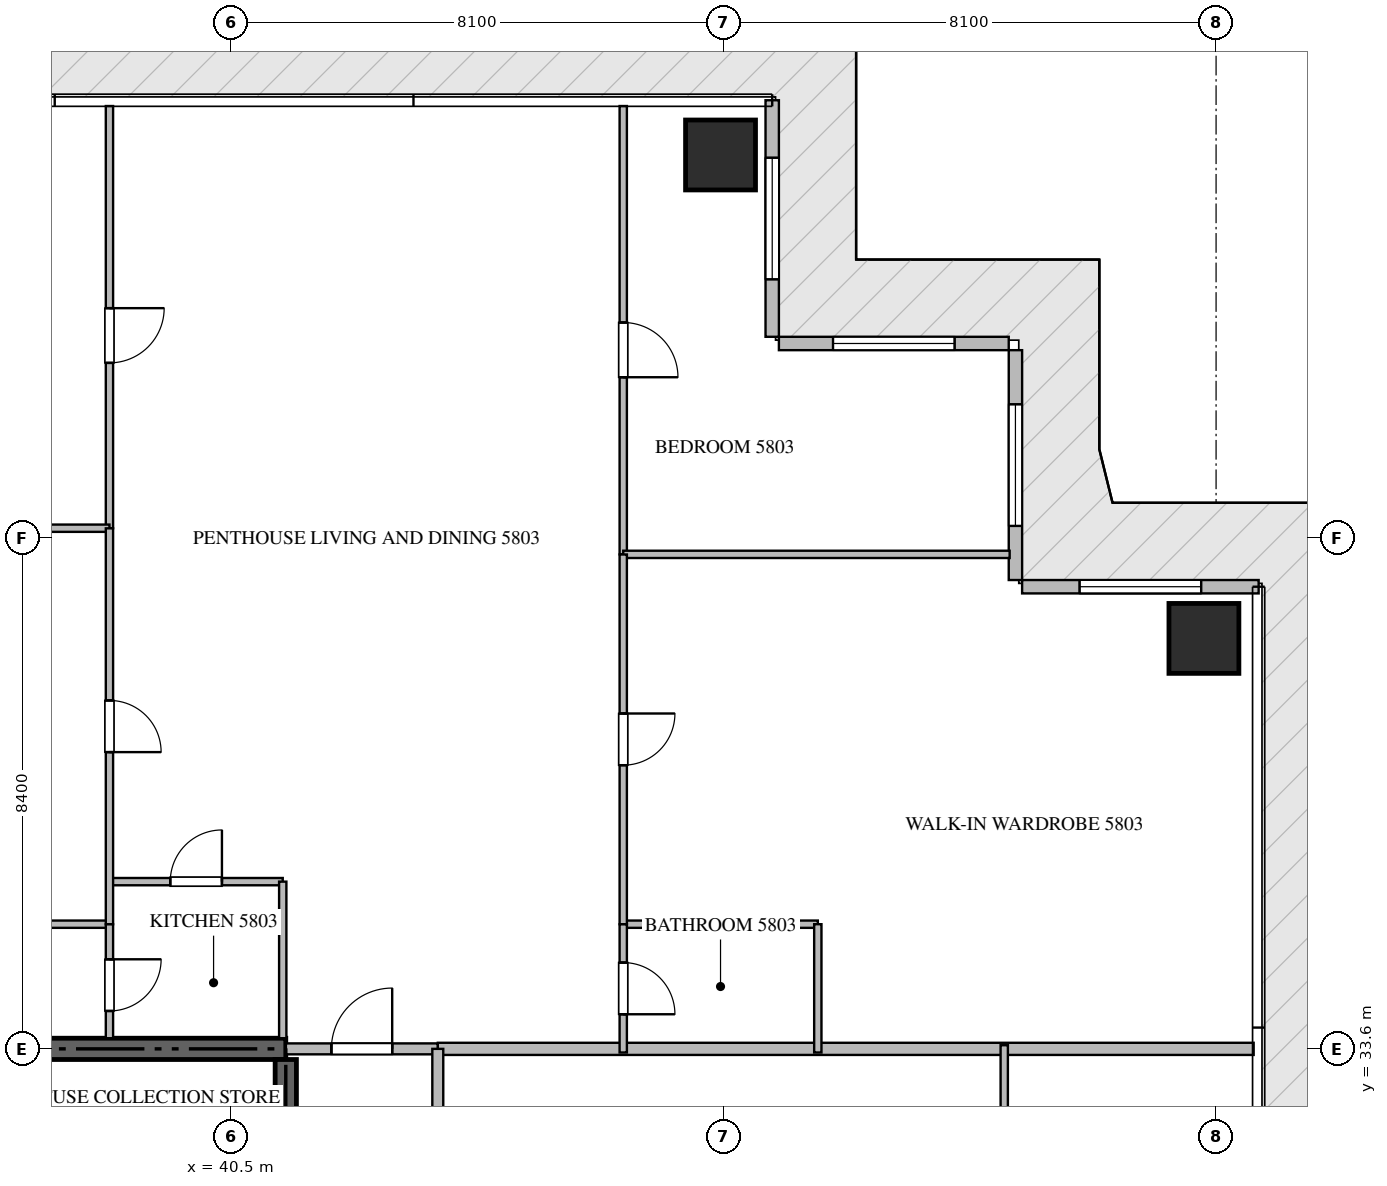
"""IFC4 building model, lengths in metres.
Left out: names, types, materials, properties, quantities, classifications, styles, units other than length and angle.
Written with IfcOpenShell. Run it as: python <this file> out.ifc"""

import sys

from ifc_helpers import new_model, si_unit, direction, frame, frame_2d, origin, origin_2d, place, context, subcontext, project, spatial, rectangle, extrude, source, transform, mapped, element, fill, save


model = new_model("IFC4")
c1 = context("Model", 3, precision=1e-05, world=origin(), true_north=direction((0.0, 1.0)))
c2 = subcontext(c1, "Body", "Model", "MODEL_VIEW")
j1 = project(units=[si_unit("LENGTHUNIT", "METRE"), si_unit("PLANEANGLEUNIT", "RADIAN")], contexts=[c1])
p1 = place(None, origin())
s1 = spatial("IfcSite", under=j1, at=p1, CompositionType="ELEMENT")
p2 = place(p1, origin())
s2 = spatial("IfcBuilding", under=s1, at=p2, CompositionType="ELEMENT")
p3 = place(p2, frame((0.0, 0.0, 233.55)))
s3 = spatial("IfcBuildingStorey", under=s2, at=p3, CompositionType="ELEMENT", Elevation=233.55)
p4 = place(p3, frame((41.4, 33.6, -0.26), z_axis=(0.0, 0.0, 1.0), x_axis=(-1.0, 0.0, 0.0)))
e1 = element("IfcWall", 1, at=p4, inside=s3, PredefinedType="SHEAR", context=c2, shape_type="SweptSolid", body=[
    extrude(rectangle(XDim=18.0, YDim=0.35, at=frame_2d((9.0, 0.0))), origin(), (0.0, 0.0, 1.0), 3.848),
])
p5 = place(p3, frame((41.4, 27.75, -0.26), z_axis=(0.0, 0.0, 1.0), x_axis=(0.0, 1.0, 0.0)))
e2 = element("IfcWall", 2, at=p5, inside=s3, PredefinedType="SHEAR", context=c2, shape_type="SweptSolid", body=[
    extrude(rectangle(XDim=5.675, YDim=0.35, at=frame_2d((2.837, 0.0))), origin(), (0.0, 0.0, 1.0), 3.848),
])
m1 = source(origin(), c2, "Body", "SweptSolid", [
    extrude(rectangle(XDim=1.15, YDim=1.15, at=origin_2d()), origin(), (0.0, 0.0, 1.0), 3.85),
])
for number, where, z_axis, x_axis in (
    (3, (48.55, 48.3, -0.26), (0.0, 0.0, 1.0), (1.0, 0.0, 0.0)),
    (4, (56.5, 40.35, -0.26), (0.0, 0.0, 1.0), (1.0, 0.0, 0.0)),
):
    element("IfcColumn", number, at=place(p3, frame(where, z_axis=z_axis, x_axis=x_axis)), inside=s3, PredefinedType="COLUMN", context=c2, shape_type="MappedRepresentation", body=[
        mapped(m1, transform((0.0, 0.0, 0.0), scale=1.0)),
    ])
p6 = place(p3, frame((57.4, 41.2, 0.0), z_axis=(0.0, 0.0, 1.0), x_axis=(-1.0, 0.0, 0.0)))
e5 = element("IfcWall", 5, at=p6, inside=s3, PredefinedType="ELEMENTEDWALL", context=c2, shape_type="SweptSolid", body=[
    extrude(rectangle(XDim=3.89, YDim=0.22, at=frame_2d((1.945, 0.0))), origin(), (0.0, 0.0, 1.0), 3.575),
])
p7 = place(p6, frame((0.945, 0.0, 0.65)))
e6 = element("IfcOpeningElement", 6, at=p7, cuts=e5, PredefinedType="OPENING", context=c2, shape_type="SweptSolid", body=[
    extrude(rectangle(XDim=2.0, YDim=2.2, at=frame_2d((1.0, 1.1))), frame((0.0, 0.12, 0.0), z_axis=(0.0, -1.0, 0.0), x_axis=(1.0, 0.0, 0.0)), (0.0, 0.0, 1.0), 0.24),
])
p8 = place(p3, frame((53.4, 41.31, 0.0), z_axis=(0.0, 0.0, 1.0), x_axis=(0.0, 1.0, 0.0)))
e7 = element("IfcWall", 7, at=p8, inside=s3, PredefinedType="ELEMENTEDWALL", context=c2, shape_type="SweptSolid", body=[
    extrude(rectangle(XDim=3.78, YDim=0.22, at=frame_2d((1.89, 0.0))), origin(), (0.0, 0.0, 1.0), 3.575),
])
p9 = place(p8, frame((0.89, 0.0, 0.65)))
e8 = element("IfcOpeningElement", 8, at=p9, cuts=e7, PredefinedType="OPENING", context=c2, shape_type="SweptSolid", body=[
    extrude(rectangle(XDim=2.0, YDim=2.2, at=frame_2d((1.0, 1.1))), frame((0.0, 0.12, 0.0), z_axis=(0.0, -1.0, 0.0), x_axis=(1.0, 0.0, 0.0)), (0.0, 0.0, 1.0), 0.24),
])
p10 = place(p3, frame((53.29, 45.2, 0.0), z_axis=(0.0, 0.0, 1.0), x_axis=(-1.0, 0.0, 0.0)))
e9 = element("IfcWall", 9, at=p10, inside=s3, PredefinedType="ELEMENTEDWALL", context=c2, shape_type="SweptSolid", body=[
    extrude(rectangle(XDim=3.78, YDim=0.22, at=frame_2d((1.89, 0.0))), origin(), (0.0, 0.0, 1.0), 3.575),
])
p11 = place(p10, frame((0.89, 0.0, 0.65)))
e10 = element("IfcOpeningElement", 10, at=p11, cuts=e9, PredefinedType="OPENING", context=c2, shape_type="SweptSolid", body=[
    extrude(rectangle(XDim=2.0, YDim=2.2, at=frame_2d((1.0, 1.1))), frame((0.0, 0.12, 0.0), z_axis=(0.0, -1.0, 0.0), x_axis=(1.0, 0.0, 0.0)), (0.0, 0.0, 1.0), 0.24),
])
p12 = place(p3, frame((49.4, 45.31, 0.0), z_axis=(0.0, 0.0, 1.0), x_axis=(0.0, 1.0, 0.0)))
e11 = element("IfcWall", 11, at=p12, inside=s3, PredefinedType="ELEMENTEDWALL", context=c2, shape_type="SweptSolid", body=[
    extrude(rectangle(XDim=3.89, YDim=0.22, at=frame_2d((1.945, 0.0))), origin(), (0.0, 0.0, 1.0), 3.575),
])
p13 = place(p12, frame((0.945, 0.0, 0.65)))
e12 = element("IfcOpeningElement", 12, at=p13, cuts=e11, PredefinedType="OPENING", context=c2, shape_type="SweptSolid", body=[
    extrude(rectangle(XDim=2.0, YDim=2.2, at=frame_2d((1.0, 1.1))), frame((0.0, 0.12, 0.0), z_axis=(0.0, -1.0, 0.0), x_axis=(1.0, 0.0, 0.0)), (0.0, 0.0, 1.0), 0.24),
])
p14 = place(p3, frame((43.9, 33.6, 0.0), z_axis=(0.0, 0.0, 1.0), x_axis=(1.0, 0.0, 0.0)))
e13 = element("IfcWall", 13, at=p14, inside=s3, PredefinedType="PARTITIONING", context=c2, shape_type="SweptSolid", body=[
    extrude(rectangle(XDim=13.418, YDim=0.2, at=frame_2d((6.709, 0.0))), origin(), (0.0, 0.0, 1.0), 3.59),
])
p15 = place(p3, frame((41.402, 33.6, 0.0), z_axis=(0.0, 0.0, 1.0), x_axis=(1.0, 0.0, 0.0)))
e14 = element("IfcWall", 14, at=p15, inside=s3, PredefinedType="PARTITIONING", context=c2, shape_type="SweptSolid", body=[
    extrude(rectangle(XDim=2.496, YDim=0.18, at=frame_2d((1.248, 0.0))), origin(), (0.0, 0.0, 1.0), 3.59),
])
p16 = place(p15, frame((0.748, 0.0, 0.0)))
e15 = element("IfcOpeningElement", 15, at=p16, cuts=e14, PredefinedType="OPENING", context=c2, shape_type="SweptSolid", body=[
    extrude(rectangle(XDim=1.0, YDim=2.15, at=frame_2d((0.5, 1.075))), frame((0.0, 0.1, 0.0), z_axis=(0.0, -1.0, 0.0), x_axis=(1.0, 0.0, 0.0)), (0.0, 0.0, 1.0), 0.2),
])
p17 = place(p3, frame((43.9, 16.8, 0.0), z_axis=(0.0, 0.0, 1.0), x_axis=(0.0, 1.0, 0.0)))
e16 = element("IfcWall", 16, at=p17, inside=s3, PredefinedType="PARTITIONING", context=c2, shape_type="SweptSolid", body=[
    extrude(rectangle(XDim=16.8, YDim=0.18, at=frame_2d((8.4, 0.0))), origin(), (0.0, 0.0, 1.0), 3.59),
])
p18 = place(p17, frame((1.3, 0.0, 0.0)))
e17 = element("IfcOpeningElement", 17, at=p18, cuts=e16, PredefinedType="OPENING", context=c2, shape_type="SweptSolid", body=[
    extrude(rectangle(XDim=1.0, YDim=2.15, at=frame_2d((0.5, 1.075))), frame((0.0, 0.1, 0.0), z_axis=(0.0, -1.0, 0.0), x_axis=(1.0, 0.0, 0.0)), (0.0, 0.0, 1.0), 0.2),
])
p19 = place(p3, frame((38.5, 36.35, 0.0), z_axis=(0.0, 0.0, 1.0), x_axis=(1.0, 0.0, 0.0)))
e18 = element("IfcWall", 18, at=p19, inside=s3, PredefinedType="PARTITIONING", context=c2, shape_type="SweptSolid", body=[
    extrude(rectangle(XDim=2.85, YDim=0.12, at=frame_2d((1.425, 0.0))), origin(), (0.0, 0.0, 1.0), 3.59),
])
p20 = place(p19, frame((1.0, 0.0, 0.0)))
e19 = element("IfcOpeningElement", 19, at=p20, cuts=e18, PredefinedType="OPENING", context=c2, shape_type="SweptSolid", body=[
    extrude(rectangle(XDim=0.85, YDim=2.1, at=frame_2d((0.425, 1.05))), frame((0.0, 0.07, 0.0), z_axis=(0.0, -1.0, 0.0), x_axis=(1.0, 0.0, 0.0)), (0.0, 0.0, 1.0), 0.14),
])
p21 = place(p3, frame((41.35, 36.35, 0.0), z_axis=(0.0, 0.0, 1.0), x_axis=(0.0, -1.0, 0.0)))
e20 = element("IfcWall", 20, at=p21, inside=s3, PredefinedType="PARTITIONING", context=c2, shape_type="SweptSolid", body=[
    extrude(rectangle(XDim=2.575, YDim=0.12, at=frame_2d((1.288, 0.0))), origin(), (0.0, 0.0, 1.0), 3.59),
])
p22 = place(p3, frame((38.5, 49.105, 0.0), z_axis=(0.0, 0.0, 1.0), x_axis=(0.0, -1.0, 0.0)))
e21 = element("IfcWall", 21, at=p22, inside=s3, PredefinedType="PARTITIONING", context=c2, shape_type="SweptSolid", body=[
    extrude(rectangle(XDim=6.943, YDim=0.12, at=frame_2d((3.471, 0.0))), origin(), (0.0, 0.0, 1.0), 3.59),
])
p23 = place(p22, frame((3.324, 0.0, 0.0)))
e22 = element("IfcOpeningElement", 22, at=p23, cuts=e21, PredefinedType="OPENING", context=c2, shape_type="SweptSolid", body=[
    extrude(rectangle(XDim=0.9, YDim=2.1, at=frame_2d((0.45, 1.05))), frame((0.0, 0.07, 0.0), z_axis=(0.0, -1.0, 0.0), x_axis=(1.0, 0.0, 0.0)), (0.0, 0.0, 1.0), 0.14),
])
p24 = place(p3, frame((32.34, 42.162, 0.0), z_axis=(0.0, 0.0, 1.0), x_axis=(1.0, 0.0, 0.0)))
e23 = element("IfcWall", 23, at=p24, inside=s3, PredefinedType="PARTITIONING", context=c2, shape_type="SweptSolid", body=[
    extrude(rectangle(XDim=6.16, YDim=0.12, at=frame_2d((3.08, 0.0))), origin(), (0.0, 0.0, 1.0), 3.59),
])
p25 = place(p3, frame((32.462, 35.65, 0.0), z_axis=(0.0, 0.0, 1.0), x_axis=(1.0, 0.0, 0.0)))
e24 = element("IfcWall", 24, at=p25, inside=s3, PredefinedType="PARTITIONING", context=c2, shape_type="SweptSolid", body=[
    extrude(rectangle(XDim=6.038, YDim=0.12, at=frame_2d((3.019, 0.0))), origin(), (0.0, 0.0, 1.0), 3.59),
])
p26 = place(p3, frame((38.5, 42.16, 0.0), z_axis=(0.0, 0.0, 1.0), x_axis=(0.0, -1.0, 0.0)))
e25 = element("IfcWall", 25, at=p26, inside=s3, PredefinedType="PARTITIONING", context=c2, shape_type="SweptSolid", body=[
    extrude(rectangle(XDim=6.51, YDim=0.12, at=frame_2d((3.255, 0.0))), origin(), (0.0, 0.0, 1.0), 3.59),
])
p27 = place(p26, frame((2.83, 0.0, 0.0)))
e26 = element("IfcOpeningElement", 26, at=p27, cuts=e25, PredefinedType="OPENING", context=c2, shape_type="SweptSolid", body=[
    extrude(rectangle(XDim=0.85, YDim=2.1, at=frame_2d((0.425, 1.05))), frame((0.0, 0.07, 0.0), z_axis=(0.0, -1.0, 0.0), x_axis=(1.0, 0.0, 0.0)), (0.0, 0.0, 1.0), 0.14),
])
p28 = place(p3, frame((38.5, 35.648, 0.0), z_axis=(0.0, 0.0, 1.0), x_axis=(0.0, -1.0, 0.0)))
e27 = element("IfcWall", 27, at=p28, inside=s3, PredefinedType="PARTITIONING", context=c2, shape_type="SweptSolid", body=[
    extrude(rectangle(XDim=1.873, YDim=0.12, at=frame_2d((0.937, 0.0))), origin(), (0.0, 0.0, 1.0), 3.59),
])
p29 = place(p28, frame((0.575, 0.0, 0.0)))
e28 = element("IfcOpeningElement", 28, at=p29, cuts=e27, PredefinedType="OPENING", context=c2, shape_type="SweptSolid", body=[
    extrude(rectangle(XDim=0.85, YDim=2.1, at=frame_2d((0.425, 1.05))), frame((0.0, 0.07, 0.0), z_axis=(0.0, -1.0, 0.0), x_axis=(1.0, 0.0, 0.0)), (0.0, 0.0, 1.0), 0.14),
])
p30 = place(p3, frame((46.95, 49.105, 0.0), z_axis=(0.0, 0.0, 1.0), x_axis=(0.0, -1.0, 0.0)))
e29 = element("IfcWall", 29, at=p30, inside=s3, PredefinedType="PARTITIONING", context=c2, shape_type="SweptSolid", body=[
    extrude(rectangle(XDim=7.373, YDim=0.12, at=frame_2d((3.687, 0.0))), origin(), (0.0, 0.0, 1.0), 3.59),
])
p31 = place(p30, frame((3.56, 0.0, 0.0)))
e30 = element("IfcOpeningElement", 30, at=p31, cuts=e29, PredefinedType="OPENING", context=c2, shape_type="SweptSolid", body=[
    extrude(rectangle(XDim=0.9, YDim=2.1, at=frame_2d((0.45, 1.05))), frame((0.0, 0.07, 0.0), z_axis=(0.0, -1.0, 0.0), x_axis=(1.0, 0.0, 0.0)), (0.0, 0.0, 1.0), 0.14),
])
p32 = place(p3, frame((46.95, 41.732, 0.0), z_axis=(0.0, 0.0, 1.0), x_axis=(1.0, 0.0, 0.0)))
e31 = element("IfcWall", 31, at=p32, inside=s3, PredefinedType="PARTITIONING", context=c2, shape_type="SweptSolid", body=[
    extrude(rectangle(XDim=6.355, YDim=0.12, at=frame_2d((3.177, 0.0))), origin(), (0.0, 0.0, 1.0), 3.59),
])
p33 = place(p3, frame((46.95, 35.65, 0.0), z_axis=(0.0, 0.0, 1.0), x_axis=(1.0, 0.0, 0.0)))
e32 = element("IfcWall", 32, at=p33, inside=s3, PredefinedType="PARTITIONING", context=c2, shape_type="SweptSolid", body=[
    extrude(rectangle(XDim=3.2, YDim=0.12, at=frame_2d((1.6, 0.0))), origin(), (0.0, 0.0, 1.0), 3.59),
])
p34 = place(p3, frame((50.15, 35.65, 0.0), z_axis=(0.0, 0.0, 1.0), x_axis=(0.0, -1.0, 0.0)))
e33 = element("IfcWall", 33, at=p34, inside=s3, PredefinedType="PARTITIONING", context=c2, shape_type="SweptSolid", body=[
    extrude(rectangle(XDim=2.11, YDim=0.12, at=frame_2d((1.055, 0.0))), origin(), (0.0, 0.0, 1.0), 3.59),
])
p35 = place(p3, frame((46.95, 41.73, 0.0), z_axis=(0.0, 0.0, 1.0), x_axis=(0.0, -1.0, 0.0)))
e34 = element("IfcWall", 34, at=p35, inside=s3, PredefinedType="PARTITIONING", context=c2, shape_type="SweptSolid", body=[
    extrude(rectangle(XDim=6.08, YDim=0.12, at=frame_2d((3.04, 0.0))), origin(), (0.0, 0.0, 1.0), 3.59),
])
p36 = place(p35, frame((2.615, 0.0, 0.0)))
e35 = element("IfcOpeningElement", 35, at=p36, cuts=e34, PredefinedType="OPENING", context=c2, shape_type="SweptSolid", body=[
    extrude(rectangle(XDim=0.85, YDim=2.1, at=frame_2d((0.425, 1.05))), frame((0.0, 0.07, 0.0), z_axis=(0.0, -1.0, 0.0), x_axis=(1.0, 0.0, 0.0)), (0.0, 0.0, 1.0), 0.14),
])
p37 = place(p3, frame((46.95, 35.648, 0.0), z_axis=(0.0, 0.0, 1.0), x_axis=(0.0, -1.0, 0.0)))
e36 = element("IfcWall", 36, at=p37, inside=s3, PredefinedType="PARTITIONING", context=c2, shape_type="SweptSolid", body=[
    extrude(rectangle(XDim=2.108, YDim=0.12, at=frame_2d((1.054, 0.0))), origin(), (0.0, 0.0, 1.0), 3.59),
])
p38 = place(p37, frame((0.629, 0.0, 0.0)))
e37 = element("IfcOpeningElement", 37, at=p38, cuts=e36, PredefinedType="OPENING", context=c2, shape_type="SweptSolid", body=[
    extrude(rectangle(XDim=0.85, YDim=2.1, at=frame_2d((0.425, 1.05))), frame((0.0, 0.07, 0.0), z_axis=(0.0, -1.0, 0.0), x_axis=(1.0, 0.0, 0.0)), (0.0, 0.0, 1.0), 0.14),
])
p39 = place(p3, frame((53.216, 23.18, 0.0), z_axis=(0.0, 0.0, 1.0), x_axis=(0.0, 1.0, 0.0)))
e38 = element("IfcWall", 38, at=p39, inside=s3, PredefinedType="PARTITIONING", context=c2, shape_type="SweptSolid", body=[
    extrude(rectangle(XDim=10.48, YDim=0.12, at=frame_2d((5.24, 0.0))), origin(), (0.0, 0.0, 1.0), 3.59),
])
m2 = source(origin(), c2, "Body", "SweptSolid", [
    extrude(rectangle(XDim=2.0, YDim=2.2, at=frame_2d((1.0, 1.1))), frame((0.0, 0.03, 0.0), z_axis=(0.0, -1.0, 0.0), x_axis=(1.0, 0.0, 0.0)), (0.0, 0.0, 1.0), 0.06),
])
p40 = place(p7, origin())
e39 = element("IfcWindow", 39, at=p40, inside=s3, PartitioningType="SINGLE_PANEL", PredefinedType="WINDOW", context=c2, shape_type="MappedRepresentation", body=[
    mapped(m2, transform((0.0, 0.0, 0.0), scale=1.0)),
])
fill(e6, e39)
p41 = place(p9, origin())
e40 = element("IfcWindow", 40, at=p41, inside=s3, PartitioningType="SINGLE_PANEL", PredefinedType="WINDOW", context=c2, shape_type="MappedRepresentation", body=[
    mapped(m2, transform((0.0, 0.0, 0.0), scale=1.0)),
])
fill(e8, e40)
p42 = place(p11, origin())
e41 = element("IfcWindow", 41, at=p42, inside=s3, PartitioningType="SINGLE_PANEL", PredefinedType="WINDOW", context=c2, shape_type="MappedRepresentation", body=[
    mapped(m2, transform((0.0, 0.0, 0.0), scale=1.0)),
])
fill(e10, e41)
p43 = place(p13, origin())
e42 = element("IfcWindow", 42, at=p43, inside=s3, PartitioningType="SINGLE_PANEL", PredefinedType="WINDOW", context=c2, shape_type="MappedRepresentation", body=[
    mapped(m2, transform((0.0, 0.0, 0.0), scale=1.0)),
])
fill(e12, e42)
m3 = source(origin(), c2, "Body", "SweptSolid", [
    extrude(rectangle(XDim=1.0, YDim=2.15, at=frame_2d((0.5, 1.075))), frame((0.0, 0.025, 0.0), z_axis=(0.0, -1.0, 0.0), x_axis=(1.0, 0.0, 0.0)), (0.0, 0.0, 1.0), 0.05),
])
p44 = place(p16, origin())
e43 = element("IfcDoor", 43, at=p44, inside=s3, OperationType="SINGLE_SWING_RIGHT", PredefinedType="DOOR", context=c2, shape_type="MappedRepresentation", body=[
    mapped(m3, transform((0.0, 0.0, 0.0), scale=1.0)),
])
fill(e15, e43)
m4 = source(origin(), c2, "Body", "SweptSolid", [
    extrude(rectangle(XDim=0.85, YDim=2.1, at=frame_2d((0.425, 1.05))), frame((0.0, 0.025, 0.0), z_axis=(0.0, -1.0, 0.0), x_axis=(1.0, 0.0, 0.0)), (0.0, 0.0, 1.0), 0.05),
])
p45 = place(p20, origin())
e44 = element("IfcDoor", 44, at=p45, inside=s3, OperationType="SINGLE_SWING_RIGHT", PredefinedType="DOOR", context=c2, shape_type="MappedRepresentation", body=[
    mapped(m4, transform((0.0, 0.0, 0.0), scale=1.0)),
])
fill(e19, e44)
m5 = source(origin(), c2, "Body", "SweptSolid", [
    extrude(rectangle(XDim=0.9, YDim=2.1, at=frame_2d((0.45, 1.05))), frame((0.0, 0.025, 0.0), z_axis=(0.0, -1.0, 0.0), x_axis=(1.0, 0.0, 0.0)), (0.0, 0.0, 1.0), 0.05),
])
p46 = place(p23, origin())
e45 = element("IfcDoor", 45, at=p46, inside=s3, OperationType="SINGLE_SWING_LEFT", PredefinedType="DOOR", context=c2, shape_type="MappedRepresentation", body=[
    mapped(m5, transform((0.0, 0.0, 0.0), scale=1.0)),
])
fill(e22, e45)
p47 = place(p27, origin())
e46 = element("IfcDoor", 46, at=p47, inside=s3, OperationType="SINGLE_SWING_RIGHT", PredefinedType="DOOR", context=c2, shape_type="MappedRepresentation", body=[
    mapped(m4, transform((0.0, 0.0, 0.0), scale=1.0)),
])
fill(e26, e46)
p48 = place(p29, origin())
e47 = element("IfcDoor", 47, at=p48, inside=s3, OperationType="SINGLE_SWING_LEFT", PredefinedType="DOOR", context=c2, shape_type="MappedRepresentation", body=[
    mapped(m4, transform((0.0, 0.0, 0.0), scale=1.0)),
])
fill(e28, e47)
p49 = place(p31, origin())
e48 = element("IfcDoor", 48, at=p49, inside=s3, OperationType="SINGLE_SWING_RIGHT", PredefinedType="DOOR", context=c2, shape_type="MappedRepresentation", body=[
    mapped(m5, transform((0.0, 0.0, 0.0), scale=1.0)),
])
fill(e30, e48)
p50 = place(p36, origin())
e49 = element("IfcDoor", 49, at=p50, inside=s3, OperationType="SINGLE_SWING_LEFT", PredefinedType="DOOR", context=c2, shape_type="MappedRepresentation", body=[
    mapped(m4, transform((0.0, 0.0, 0.0), scale=1.0)),
])
fill(e35, e49)
p51 = place(p38, origin())
e50 = element("IfcDoor", 50, at=p51, inside=s3, OperationType="SINGLE_SWING_RIGHT", PredefinedType="DOOR", context=c2, shape_type="MappedRepresentation", body=[
    mapped(m4, transform((0.0, 0.0, 0.0), scale=1.0)),
])
fill(e37, e50)
save(model, sys.argv[1])
